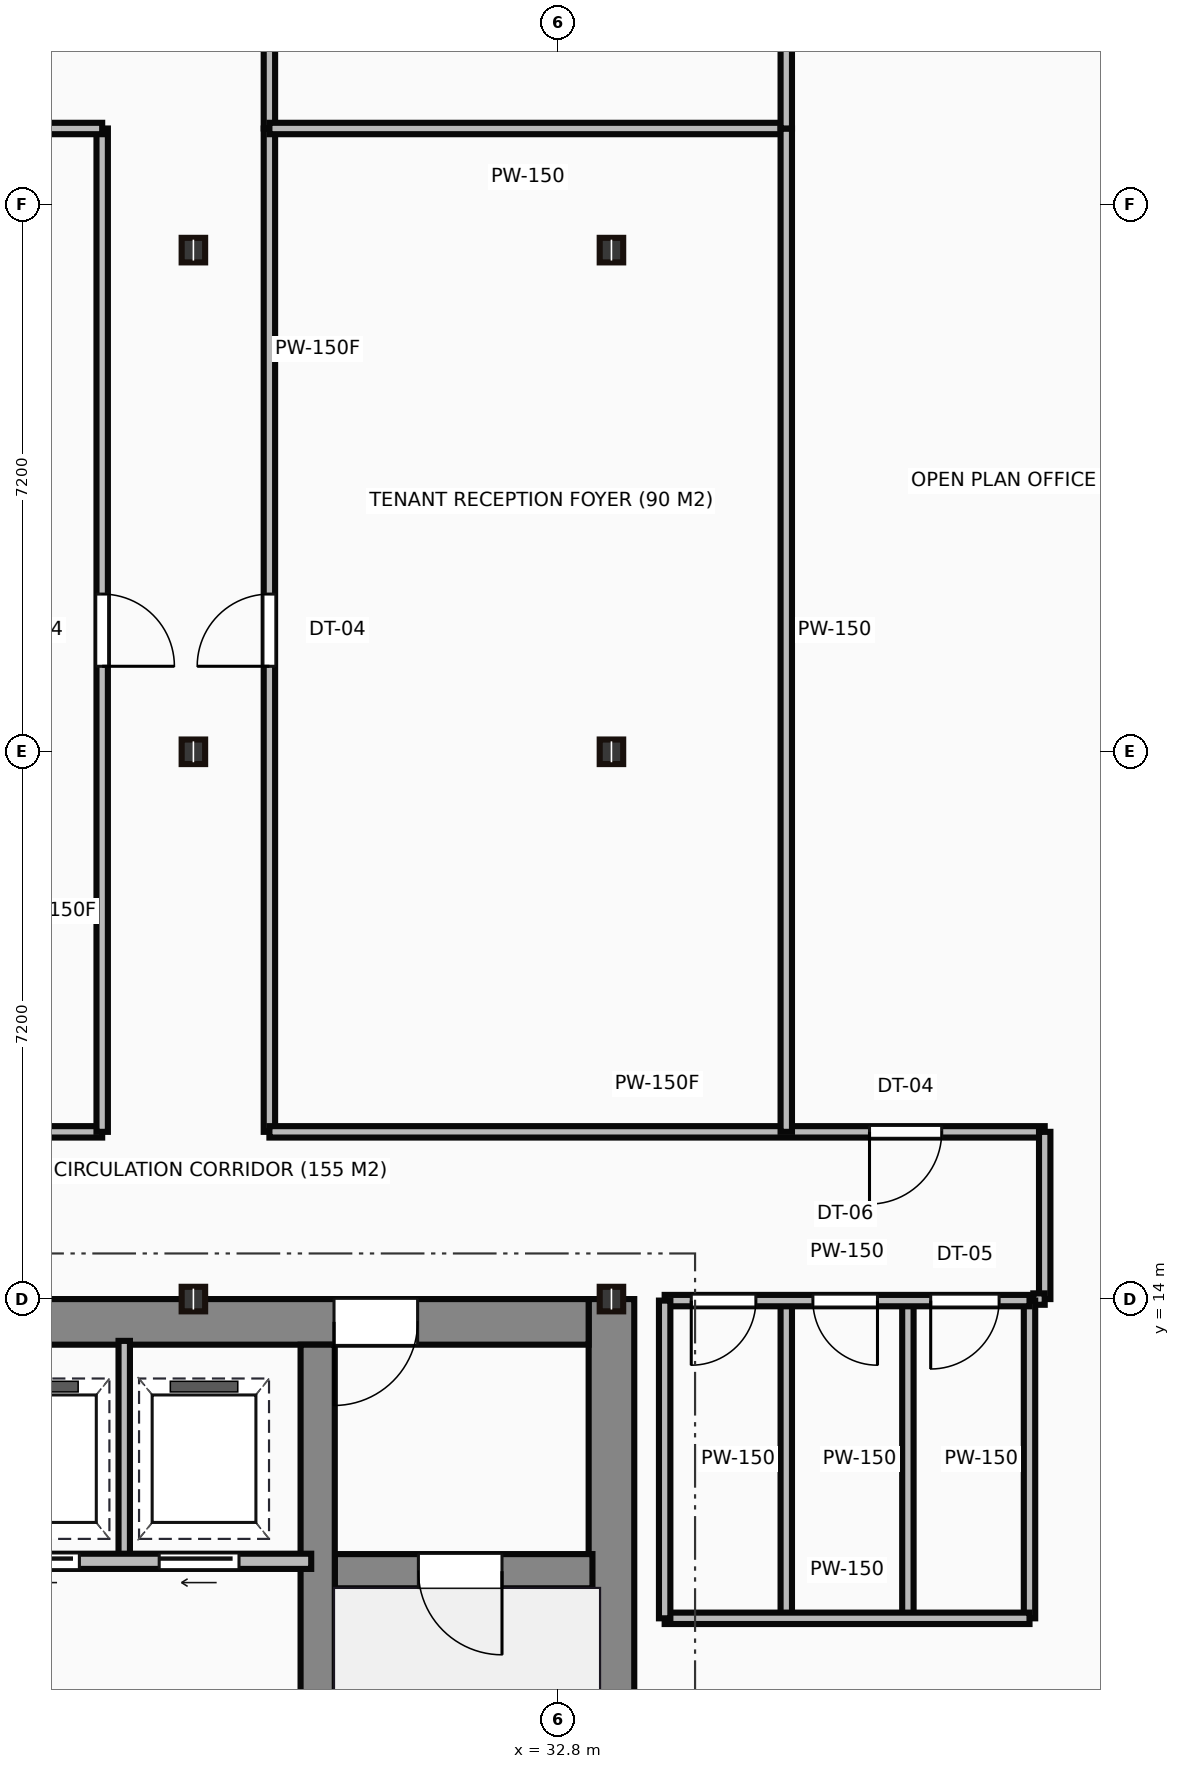
"""IFC4 building model, lengths in metres.
Left out: names, types, materials, properties, quantities, classifications, styles, units other than length and angle.
Written with IfcOpenShell. Run it as: python <this file> out.ifc"""

import sys

from ifc_helpers import new_model, si_unit, direction, frame, frame_2d, origin, origin_2d, place, context, subcontext, project, spatial, rectangle, i_section, extrude, source, transform, mapped, element, fill, save


model = new_model("IFC4")
c1 = context("Model", 3, precision=1e-05, world=origin(), true_north=direction((0.0, 1.0)))
c2 = subcontext(c1, "Body", "Model", "MODEL_VIEW")
j1 = project(units=[si_unit("LENGTHUNIT", "METRE"), si_unit("PLANEANGLEUNIT", "RADIAN")], contexts=[c1])
p1 = place(None, origin())
s1 = spatial("IfcSite", under=j1, at=p1, CompositionType="ELEMENT")
p2 = place(p1, origin())
s2 = spatial("IfcBuilding", under=s1, at=p2, CompositionType="ELEMENT")
p3 = place(p2, frame((0.0, 0.0, 225.1)))
s3 = spatial("IfcBuildingStorey", under=s2, at=p3, CompositionType="ELEMENT", Elevation=225.1)
m1 = source(origin(), c2, "Body", "SweptSolid", [
    extrude(rectangle(XDim=13.1, YDim=0.6, at=frame_2d((6.55, 0.0))), origin(), (0.0, 0.0, 1.0), 3.65),
])
p4 = place(p3, frame((33.5, 0.9, 0.0), z_axis=(0.0, 0.0, 1.0), x_axis=(0.0, 1.0, 0.0)))
e1 = element("IfcWall", 1, at=p4, inside=s3, PredefinedType="SHEAR", context=c2, shape_type="MappedRepresentation", body=[
    mapped(m1, transform((0.0, 0.0, 0.0))),
])
m2 = source(origin(), c2, "Body", "SweptSolid", [
    extrude(rectangle(XDim=12.6, YDim=0.6, at=frame_2d((6.3, 0.0))), origin(), (0.0, 0.0, 1.0), 3.65),
])
p5 = place(p3, frame((20.6, 13.7, 0.0), z_axis=(0.0, 0.0, 1.0), x_axis=(1.0, 0.0, 0.0)))
e2 = element("IfcWall", 2, at=p5, inside=s3, PredefinedType="SHEAR", context=c2, shape_type="MappedRepresentation", body=[
    mapped(m2, transform((0.0, 0.0, 0.0))),
])
p6 = place(p5, frame((9.25, 0.0, 0.0)))
e3 = element("IfcOpeningElement", 3, at=p6, cuts=e2, PredefinedType="OPENING", context=c2, shape_type="SweptSolid", body=[
    extrude(rectangle(XDim=1.1, YDim=2.15, at=frame_2d((0.55, 1.075))), frame((0.0, 0.31, 0.0), z_axis=(0.0, -1.0, 0.0), x_axis=(1.0, 0.0, 0.0)), (0.0, 0.0, 1.0), 0.62),
])
m3 = source(origin(), c2, "Body", "SweptSolid", [
    extrude(rectangle(XDim=12.5, YDim=0.45, at=frame_2d((6.25, 0.0))), origin(), (0.0, 0.0, 1.0), 3.65),
])
p7 = place(p3, frame((29.635, 0.9, 0.0), z_axis=(0.0, 0.0, 1.0), x_axis=(0.0, 1.0, 0.0)))
e4 = element("IfcWall", 4, at=p7, inside=s3, PredefinedType="SHEAR", context=c2, shape_type="MappedRepresentation", body=[
    mapped(m3, transform((0.0, 0.0, 0.0))),
])
m4 = source(origin(), c2, "Body", "SweptSolid", [
    extrude(rectangle(XDim=3.39, YDim=0.45, at=frame_2d((1.695, 0.0))), origin(), (0.0, 0.0, 1.0), 3.65),
])
p8 = place(p3, frame((29.86, 10.42, 0.0), z_axis=(0.0, 0.0, 1.0), x_axis=(1.0, 0.0, 0.0)))
e5 = element("IfcWall", 5, at=p8, inside=s3, PredefinedType="SHEAR", context=c2, shape_type="MappedRepresentation", body=[
    mapped(m4, transform((0.0, 0.0, 0.0))),
])
p9 = place(p8, frame((1.1, 0.0, 0.0)))
e6 = element("IfcOpeningElement", 6, at=p9, cuts=e5, PredefinedType="OPENING", context=c2, shape_type="SweptSolid", body=[
    extrude(rectangle(XDim=1.1, YDim=2.15, at=frame_2d((0.55, 1.075))), frame((0.0, 0.235, 0.0), z_axis=(0.0, -1.0, 0.0), x_axis=(1.0, 0.0, 0.0)), (0.0, 0.0, 1.0), 0.47),
])
m5 = source(origin(), c2, "Body", "SweptSolid", [
    extrude(i_section(OverallWidth=0.309, OverallDepth=0.323, WebThickness=0.014, FlangeThickness=0.023, at=origin_2d()), origin(), (0.0, 0.0, 1.0), 3.65),
])
for number, where, z_axis, x_axis in (
    (7, (28.0, 14.0, 0.0), (0.0, 0.0, 1.0), (1.0, 0.0, 0.0)),
    (8, (28.0, 21.2, 0.0), (0.0, 0.0, 1.0), (1.0, 0.0, 0.0)),
    (9, (28.0, 27.8, 0.0), (0.0, 0.0, 1.0), (1.0, 0.0, 0.0)),
    (10, (33.5, 14.0, 0.0), (0.0, 0.0, 1.0), (1.0, 0.0, 0.0)),
    (11, (33.5, 21.2, 0.0), (0.0, 0.0, 1.0), (1.0, 0.0, 0.0)),
    (12, (33.5, 27.8, 0.0), (0.0, 0.0, 1.0), (1.0, 0.0, 0.0)),
):
    element("IfcColumn", number, at=place(p3, frame(where, z_axis=z_axis, x_axis=x_axis)), inside=s3, PredefinedType="COLUMN", context=c2, shape_type="MappedRepresentation", body=[
        mapped(m5, transform((0.0, 0.0, 0.0))),
    ])
m6 = source(origin(), c2, "Body", "SweptSolid", [
    extrude(rectangle(XDim=8.8, YDim=0.2, at=frame_2d((4.4, 0.0))), origin(), (0.0, 0.0, 1.0), 3.4),
])
p10 = place(p3, frame((20.75, 10.55, 0.0), z_axis=(0.0, 0.0, 1.0), x_axis=(1.0, 0.0, 0.0)))
e13 = element("IfcWall", 13, at=p10, inside=s3, PredefinedType="PARTITIONING", context=c2, shape_type="MappedRepresentation", body=[
    mapped(m6, transform((0.0, 0.0, 0.0))),
])
p11 = place(p10, frame((0.5, 0.0, 0.0)))
e14 = element("IfcOpeningElement", 14, at=p11, cuts=e13, PredefinedType="OPENING", context=c2, shape_type="SweptSolid", body=[
    extrude(rectangle(XDim=1.05, YDim=2.15, at=frame_2d((0.525, 1.075))), frame((0.0, 0.11, 0.0), z_axis=(0.0, -1.0, 0.0), x_axis=(1.0, 0.0, 0.0)), (0.0, 0.0, 1.0), 0.22),
])
p12 = place(p10, frame((2.6, 0.0, 0.0)))
e15 = element("IfcOpeningElement", 15, at=p12, cuts=e13, PredefinedType="OPENING", context=c2, shape_type="SweptSolid", body=[
    extrude(rectangle(XDim=1.05, YDim=2.15, at=frame_2d((0.525, 1.075))), frame((0.0, 0.11, 0.0), z_axis=(0.0, -1.0, 0.0), x_axis=(1.0, 0.0, 0.0)), (0.0, 0.0, 1.0), 0.22),
])
p13 = place(p10, frame((4.7, 0.0, 0.0)))
e16 = element("IfcOpeningElement", 16, at=p13, cuts=e13, PredefinedType="OPENING", context=c2, shape_type="SweptSolid", body=[
    extrude(rectangle(XDim=1.05, YDim=2.15, at=frame_2d((0.525, 1.075))), frame((0.0, 0.11, 0.0), z_axis=(0.0, -1.0, 0.0), x_axis=(1.0, 0.0, 0.0)), (0.0, 0.0, 1.0), 0.22),
])
p14 = place(p10, frame((6.8, 0.0, 0.0)))
e17 = element("IfcOpeningElement", 17, at=p14, cuts=e13, PredefinedType="OPENING", context=c2, shape_type="SweptSolid", body=[
    extrude(rectangle(XDim=1.05, YDim=2.15, at=frame_2d((0.525, 1.075))), frame((0.0, 0.11, 0.0), z_axis=(0.0, -1.0, 0.0), x_axis=(1.0, 0.0, 0.0)), (0.0, 0.0, 1.0), 0.22),
])
m7 = source(origin(), c2, "Body", "SweptSolid", [
    extrude(rectangle(XDim=2.85, YDim=0.15, at=frame_2d((1.425, 0.0))), origin(), (0.0, 0.0, 1.0), 3.4),
])
p15 = place(p3, frame((27.09, 10.6, 0.0), z_axis=(0.0, 0.0, 1.0), x_axis=(0.0, 1.0, 0.0)))
e18 = element("IfcWall", 18, at=p15, inside=s3, PredefinedType="PARTITIONING", context=c2, shape_type="MappedRepresentation", body=[
    mapped(m7, transform((0.0, 0.0, 0.0))),
])
m8 = source(origin(), c2, "Body", "SweptSolid", [
    extrude(rectangle(XDim=4.8, YDim=0.15, at=frame_2d((2.4, 0.0))), origin(), (0.0, 0.0, 1.0), 2.787),
])
p16 = place(p3, frame((34.2, 13.98, 0.0), z_axis=(0.0, 0.0, 1.0), x_axis=(1.0, 0.0, 0.0)))
e19 = element("IfcWall", 19, at=p16, inside=s3, PredefinedType="PARTITIONING", context=c2, shape_type="MappedRepresentation", body=[
    mapped(m8, transform((0.0, 0.0, 0.0))),
])
p17 = place(p16, frame((0.35, 0.0, 0.0)))
e20 = element("IfcOpeningElement", 20, at=p17, cuts=e19, PredefinedType="OPENING", context=c2, shape_type="SweptSolid", body=[
    extrude(rectangle(XDim=0.85, YDim=2.1, at=frame_2d((0.425, 1.05))), frame((0.0, 0.085, 0.0), z_axis=(0.0, -1.0, 0.0), x_axis=(1.0, 0.0, 0.0)), (0.0, 0.0, 1.0), 0.17),
])
p18 = place(p16, frame((1.95, 0.0, 0.0)))
e21 = element("IfcOpeningElement", 21, at=p18, cuts=e19, PredefinedType="OPENING", context=c2, shape_type="SweptSolid", body=[
    extrude(rectangle(XDim=0.85, YDim=2.1, at=frame_2d((0.425, 1.05))), frame((0.0, 0.085, 0.0), z_axis=(0.0, -1.0, 0.0), x_axis=(1.0, 0.0, 0.0)), (0.0, 0.0, 1.0), 0.17),
])
p19 = place(p16, frame((3.5, 0.0, 0.0)))
e22 = element("IfcOpeningElement", 22, at=p19, cuts=e19, PredefinedType="OPENING", context=c2, shape_type="SweptSolid", body=[
    extrude(rectangle(XDim=0.9, YDim=2.1, at=frame_2d((0.45, 1.05))), frame((0.0, 0.085, 0.0), z_axis=(0.0, -1.0, 0.0), x_axis=(1.0, 0.0, 0.0)), (0.0, 0.0, 1.0), 0.17),
])
m9 = source(origin(), c2, "Body", "SweptSolid", [
    extrude(rectangle(XDim=4.8, YDim=0.15, at=frame_2d((2.4, 0.0))), origin(), (0.0, 0.0, 1.0), 3.4),
])
p20 = place(p3, frame((34.2, 9.8, 0.0), z_axis=(0.0, 0.0, 1.0), x_axis=(1.0, 0.0, 0.0)))
e23 = element("IfcWall", 23, at=p20, inside=s3, PredefinedType="PARTITIONING", context=c2, shape_type="MappedRepresentation", body=[
    mapped(m9, transform((0.0, 0.0, 0.0))),
])
m10 = source(origin(), c2, "Body", "SweptSolid", [
    extrude(rectangle(XDim=4.18, YDim=0.15, at=frame_2d((2.09, 0.0))), origin(), (0.0, 0.0, 1.0), 3.4),
])
for number, where, z_axis, x_axis in (
    (24, (39.0, 9.8, 0.0), (0.0, 0.0, 1.0), (0.0, 1.0, 0.0)),
    (25, (34.2, 9.8, 0.0), (0.0, 0.0, 1.0), (0.0, 1.0, 0.0)),
    (26, (35.8, 9.8, 0.0), (0.0, 0.0, 1.0), (0.0, 1.0, 0.0)),
    (27, (37.4, 9.8, 0.0), (0.0, 0.0, 1.0), (0.0, 1.0, 0.0)),
):
    element("IfcWall", number, at=place(p3, frame(where, z_axis=z_axis, x_axis=x_axis)), inside=s3, PredefinedType="PARTITIONING", context=c2, shape_type="MappedRepresentation", body=[
        mapped(m10, transform((0.0, 0.0, 0.0))),
    ])
m11 = source(origin(), c2, "Body", "SweptSolid", [
    extrude(rectangle(XDim=22.2, YDim=0.15, at=frame_2d((11.1, 0.0))), origin(), (0.0, 0.0, 1.0), 3.4),
])
p21 = place(p3, frame((4.6, 16.2, 0.0), z_axis=(0.0, 0.0, 1.0), x_axis=(1.0, 0.0, 0.0)))
e28 = element("IfcWall", 28, at=p21, inside=s3, PredefinedType="PARTITIONING", context=c2, shape_type="MappedRepresentation", body=[
    mapped(m11, transform((0.0, 0.0, 0.0))),
])
p22 = place(p21, frame((2.255, 0.0, 0.0)))
e29 = element("IfcOpeningElement", 29, at=p22, cuts=e28, PredefinedType="OPENING", context=c2, shape_type="SweptSolid", body=[
    extrude(rectangle(XDim=0.95, YDim=2.15, at=frame_2d((0.475, 1.075))), frame((0.0, 0.085, 0.0), z_axis=(0.0, -1.0, 0.0), x_axis=(1.0, 0.0, 0.0)), (0.0, 0.0, 1.0), 0.17),
])
p23 = place(p21, frame((9.025, 0.0, 0.0)))
e30 = element("IfcOpeningElement", 30, at=p23, cuts=e28, PredefinedType="OPENING", context=c2, shape_type="SweptSolid", body=[
    extrude(rectangle(XDim=0.95, YDim=2.15, at=frame_2d((0.475, 1.075))), frame((0.0, 0.085, 0.0), z_axis=(0.0, -1.0, 0.0), x_axis=(1.0, 0.0, 0.0)), (0.0, 0.0, 1.0), 0.17),
])
m12 = source(origin(), c2, "Body", "SweptSolid", [
    extrude(rectangle(XDim=13.2, YDim=0.15, at=frame_2d((6.6, 0.0))), origin(), (0.0, 0.0, 1.0), 3.4),
])
p24 = place(p3, frame((26.8, 16.2, 0.0), z_axis=(0.0, 0.0, 1.0), x_axis=(0.0, 1.0, 0.0)))
e31 = element("IfcWall", 31, at=p24, inside=s3, PredefinedType="PARTITIONING", context=c2, shape_type="MappedRepresentation", body=[
    mapped(m12, transform((0.0, 0.0, 0.0))),
])
p25 = place(p24, frame((6.125, 0.0, 0.0)))
e32 = element("IfcOpeningElement", 32, at=p25, cuts=e31, PredefinedType="OPENING", context=c2, shape_type="SweptSolid", body=[
    extrude(rectangle(XDim=0.95, YDim=2.15, at=frame_2d((0.475, 1.075))), frame((0.0, 0.085, 0.0), z_axis=(0.0, -1.0, 0.0), x_axis=(1.0, 0.0, 0.0)), (0.0, 0.0, 1.0), 0.17),
])
p26 = place(p3, frame((26.8, 29.4, 0.0), z_axis=(0.0, 0.0, 1.0), x_axis=(-1.0, 0.0, 0.0)))
e33 = element("IfcWall", 33, at=p26, inside=s3, PredefinedType="PARTITIONING", context=c2, shape_type="MappedRepresentation", body=[
    mapped(m11, transform((0.0, 0.0, 0.0))),
])
m13 = source(origin(), c2, "Body", "SweptSolid", [
    extrude(rectangle(XDim=2.05, YDim=0.15, at=frame_2d((1.025, 0.0))), origin(), (0.0, 0.0, 1.0), 3.4),
])
p27 = place(p3, frame((29.0, 31.45, 0.0), z_axis=(0.0, 0.0, 1.0), x_axis=(0.0, -1.0, 0.0)))
e34 = element("IfcWall", 34, at=p27, inside=s3, PredefinedType="PARTITIONING", context=c2, shape_type="MappedRepresentation", body=[
    mapped(m13, transform((0.0, 0.0, 0.0))),
])
p28 = place(p3, frame((29.0, 29.4, 0.0), z_axis=(0.0, 0.0, 1.0), x_axis=(0.0, -1.0, 0.0)))
e35 = element("IfcWall", 35, at=p28, inside=s3, PredefinedType="PARTITIONING", context=c2, shape_type="MappedRepresentation", body=[
    mapped(m12, transform((0.0, 0.0, 0.0))),
])
p29 = place(p28, frame((6.125, 0.0, 0.0)))
e36 = element("IfcOpeningElement", 36, at=p29, cuts=e35, PredefinedType="OPENING", context=c2, shape_type="SweptSolid", body=[
    extrude(rectangle(XDim=0.95, YDim=2.15, at=frame_2d((0.475, 1.075))), frame((0.0, 0.085, 0.0), z_axis=(0.0, -1.0, 0.0), x_axis=(1.0, 0.0, 0.0)), (0.0, 0.0, 1.0), 0.17),
])
m14 = source(origin(), c2, "Body", "SweptSolid", [
    extrude(rectangle(XDim=10.2, YDim=0.15, at=frame_2d((5.1, 0.0))), origin(), (0.0, 0.0, 1.0), 3.4),
])
p30 = place(p3, frame((29.0, 16.2, 0.0), z_axis=(0.0, 0.0, 1.0), x_axis=(1.0, 0.0, 0.0)))
e37 = element("IfcWall", 37, at=p30, inside=s3, PredefinedType="PARTITIONING", context=c2, shape_type="MappedRepresentation", body=[
    mapped(m14, transform((0.0, 0.0, 0.0))),
])
p31 = place(p30, frame((7.895, 0.0, 0.0)))
e38 = element("IfcOpeningElement", 38, at=p31, cuts=e37, PredefinedType="OPENING", context=c2, shape_type="SweptSolid", body=[
    extrude(rectangle(XDim=0.95, YDim=2.15, at=frame_2d((0.475, 1.075))), frame((0.0, 0.085, 0.0), z_axis=(0.0, -1.0, 0.0), x_axis=(1.0, 0.0, 0.0)), (0.0, 0.0, 1.0), 0.17),
])
m15 = source(origin(), c2, "Body", "SweptSolid", [
    extrude(rectangle(XDim=2.2, YDim=0.15, at=frame_2d((1.1, 0.0))), origin(), (0.0, 0.0, 1.0), 3.4),
])
p32 = place(p3, frame((39.2, 16.2, 0.0), z_axis=(0.0, 0.0, 1.0), x_axis=(0.0, -1.0, 0.0)))
e39 = element("IfcWall", 39, at=p32, inside=s3, PredefinedType="PARTITIONING", context=c2, shape_type="MappedRepresentation", body=[
    mapped(m15, transform((0.0, 0.0, 0.0))),
])
m16 = source(origin(), c2, "Body", "SweptSolid", [
    extrude(rectangle(XDim=0.15, YDim=0.15, at=frame_2d((0.075, 0.0))), origin(), (0.0, 0.0, 1.0), 3.4),
])
p33 = place(p3, frame((39.2, 14.0, 0.0), z_axis=(0.0, 0.0, 1.0), x_axis=(-1.0, 0.0, 0.0)))
e40 = element("IfcWall", 40, at=p33, inside=s3, PredefinedType="PARTITIONING", context=c2, shape_type="MappedRepresentation", body=[
    mapped(m16, transform((0.0, 0.0, 0.0))),
])
m17 = source(origin(), c2, "Body", "SweptSolid", [
    extrude(rectangle(XDim=6.8, YDim=0.15, at=frame_2d((3.4, 0.0))), origin(), (0.0, 0.0, 1.0), 3.4),
])
p34 = place(p3, frame((35.8, 29.4, 0.0), z_axis=(0.0, 0.0, 1.0), x_axis=(-1.0, 0.0, 0.0)))
e41 = element("IfcWall", 41, at=p34, inside=s3, PredefinedType="PARTITIONING", context=c2, shape_type="MappedRepresentation", body=[
    mapped(m17, transform((0.0, 0.0, 0.0))),
])
p35 = place(p3, frame((35.8, 29.4, 0.0), z_axis=(0.0, 0.0, 1.0), x_axis=(0.0, -1.0, 0.0)))
e42 = element("IfcWall", 42, at=p35, inside=s3, PredefinedType="PARTITIONING", context=c2, shape_type="MappedRepresentation", body=[
    mapped(m12, transform((0.0, 0.0, 0.0))),
])
m18 = source(origin(), c2, "Body", "SweptSolid", [
    extrude(rectangle(XDim=5.88, YDim=0.15, at=frame_2d((2.94, 0.0))), origin(), (0.0, 0.0, 1.0), 3.4),
])
p36 = place(p3, frame((35.8, 35.28, 0.0), z_axis=(0.0, 0.0, 1.0), x_axis=(0.0, -1.0, 0.0)))
e43 = element("IfcWall", 43, at=p36, inside=s3, PredefinedType="PARTITIONING", context=c2, shape_type="MappedRepresentation", body=[
    mapped(m18, transform((0.0, 0.0, 0.0))),
])
m19 = source(origin(), c2, "Body", "SweptSolid", [
    extrude(rectangle(XDim=1.1, YDim=2.15, at=frame_2d((0.55, 1.075))), frame((0.0, 0.025, 0.0), z_axis=(0.0, -1.0, 0.0), x_axis=(1.0, 0.0, 0.0)), (0.0, 0.0, 1.0), 0.05),
])
p37 = place(p9, frame((1.1, 0.0, 0.0), z_axis=(0.0, 0.0, 1.0), x_axis=(-1.0, 0.0, 0.0)))
e44 = element("IfcDoor", 44, at=p37, inside=s3, OperationType="SINGLE_SWING_RIGHT", PredefinedType="DOOR", context=c2, shape_type="MappedRepresentation", body=[
    mapped(m19, transform((0.0, 0.0, 0.0))),
])
fill(e6, e44)
p38 = place(p6, origin())
e45 = element("IfcDoor", 45, at=p38, inside=s3, OperationType="SINGLE_SWING_LEFT", PredefinedType="DOOR", context=c2, shape_type="MappedRepresentation", body=[
    mapped(m19, transform((0.0, 0.0, 0.0))),
])
fill(e3, e45)
m20 = source(origin(), c2, "Body", "SweptSolid", [
    extrude(rectangle(XDim=1.05, YDim=2.15, at=frame_2d((0.525, 1.075))), frame((0.0, 0.025, 0.0), z_axis=(0.0, -1.0, 0.0), x_axis=(1.0, 0.0, 0.0)), (0.0, 0.0, 1.0), 0.05),
])
p39 = place(p13, frame((1.05, 0.0, 0.0), z_axis=(0.0, 0.0, 1.0), x_axis=(-1.0, 0.0, 0.0)))
e46 = element("IfcDoor", 46, at=p39, inside=s3, OperationType="SLIDING_TO_LEFT", PredefinedType="DOOR", context=c2, shape_type="MappedRepresentation", body=[
    mapped(m20, transform((0.0, 0.0, 0.0))),
])
fill(e16, e46)
p40 = place(p14, frame((1.05, 0.0, 0.0), z_axis=(0.0, 0.0, 1.0), x_axis=(-1.0, 0.0, 0.0)))
e47 = element("IfcDoor", 47, at=p40, inside=s3, OperationType="SLIDING_TO_LEFT", PredefinedType="DOOR", context=c2, shape_type="MappedRepresentation", body=[
    mapped(m20, transform((0.0, 0.0, 0.0))),
])
fill(e17, e47)
m21 = source(origin(), c2, "Body", "SweptSolid", [
    extrude(rectangle(XDim=0.85, YDim=2.1, at=frame_2d((0.425, 1.05))), frame((0.0, 0.025, 0.0), z_axis=(0.0, -1.0, 0.0), x_axis=(1.0, 0.0, 0.0)), (0.0, 0.0, 1.0), 0.05),
])
p41 = place(p17, frame((0.85, 0.0, 0.0), z_axis=(0.0, 0.0, 1.0), x_axis=(-1.0, 0.0, 0.0)))
e48 = element("IfcDoor", 48, at=p41, inside=s3, OperationType="SINGLE_SWING_LEFT", PredefinedType="DOOR", context=c2, shape_type="MappedRepresentation", body=[
    mapped(m21, transform((0.0, 0.0, 0.0))),
])
fill(e20, e48)
p42 = place(p18, frame((0.85, 0.0, 0.0), z_axis=(0.0, 0.0, 1.0), x_axis=(-1.0, 0.0, 0.0)))
e49 = element("IfcDoor", 49, at=p42, inside=s3, OperationType="SINGLE_SWING_RIGHT", PredefinedType="DOOR", context=c2, shape_type="MappedRepresentation", body=[
    mapped(m21, transform((0.0, 0.0, 0.0))),
])
fill(e21, e49)
m22 = source(origin(), c2, "Body", "SweptSolid", [
    extrude(rectangle(XDim=0.9, YDim=2.1, at=frame_2d((0.45, 1.05))), frame((0.0, 0.025, 0.0), z_axis=(0.0, -1.0, 0.0), x_axis=(1.0, 0.0, 0.0)), (0.0, 0.0, 1.0), 0.05),
])
p43 = place(p19, frame((0.9, 0.0, 0.0), z_axis=(0.0, 0.0, 1.0), x_axis=(-1.0, 0.0, 0.0)))
e50 = element("IfcDoor", 50, at=p43, inside=s3, OperationType="SINGLE_SWING_LEFT", PredefinedType="DOOR", context=c2, shape_type="MappedRepresentation", body=[
    mapped(m22, transform((0.0, 0.0, 0.0))),
])
fill(e22, e50)
m23 = source(origin(), c2, "Body", "SweptSolid", [
    extrude(rectangle(XDim=0.95, YDim=2.15, at=frame_2d((0.475, 1.075))), frame((0.0, 0.025, 0.0), z_axis=(0.0, -1.0, 0.0), x_axis=(1.0, 0.0, 0.0)), (0.0, 0.0, 1.0), 0.05),
])
p44 = place(p25, origin())
e51 = element("IfcDoor", 51, at=p44, inside=s3, OperationType="SINGLE_SWING_LEFT", PredefinedType="DOOR", context=c2, shape_type="MappedRepresentation", body=[
    mapped(m23, transform((0.0, 0.0, 0.0))),
])
fill(e32, e51)
p45 = place(p29, origin())
e52 = element("IfcDoor", 52, at=p45, inside=s3, OperationType="SINGLE_SWING_RIGHT", PredefinedType="DOOR", context=c2, shape_type="MappedRepresentation", body=[
    mapped(m23, transform((0.0, 0.0, 0.0))),
])
fill(e36, e52)
p46 = place(p31, origin())
e53 = element("IfcDoor", 53, at=p46, inside=s3, OperationType="SINGLE_SWING_LEFT", PredefinedType="DOOR", context=c2, shape_type="MappedRepresentation", body=[
    mapped(m23, transform((0.0, 0.0, 0.0))),
])
fill(e38, e53)
save(model, sys.argv[1])
